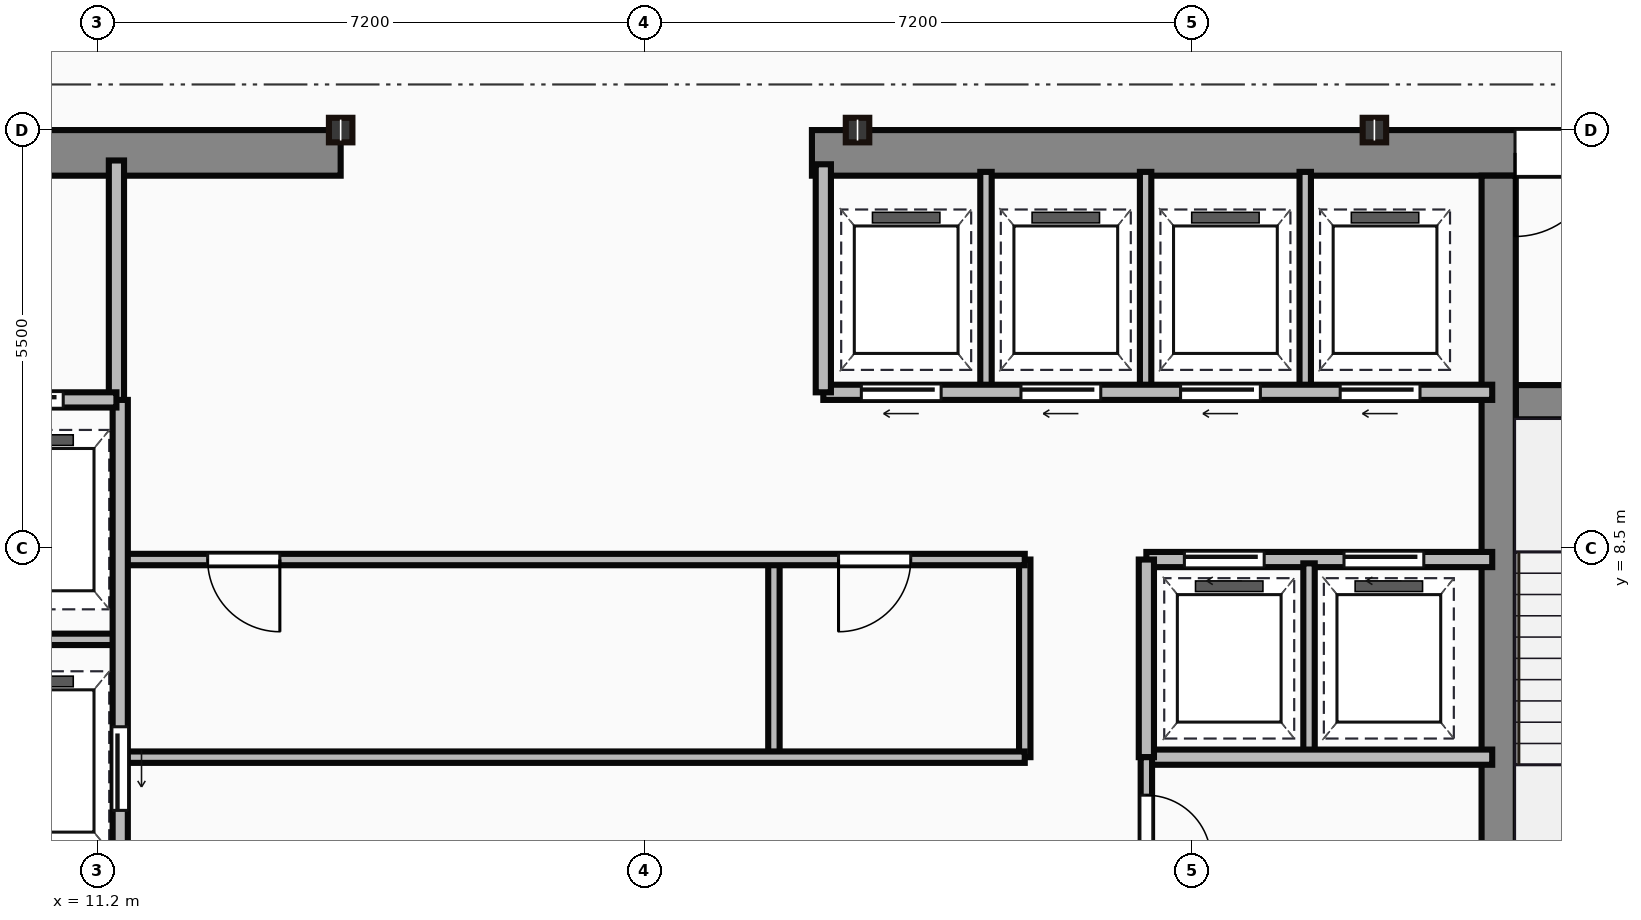
"""IFC4 building model, lengths in metres.
Left out: names, types, materials, properties, quantities, classifications, styles, units other than length and angle.
Written with IfcOpenShell. Run it as: python <this file> out.ifc"""

import sys

from ifc_helpers import new_model, si_unit, direction, frame, frame_2d, origin, origin_2d, place, context, subcontext, project, spatial, rectangle, i_section, extrude, source, transform, mapped, element, fill, save


model = new_model("IFC4")
c1 = context("Model", 3, precision=1e-05, world=origin(), true_north=direction((0.0, 1.0)))
c2 = subcontext(c1, "Body", "Model", "MODEL_VIEW")
j1 = project(units=[si_unit("LENGTHUNIT", "METRE"), si_unit("PLANEANGLEUNIT", "RADIAN")], contexts=[c1])
p1 = place(None, origin())
s1 = spatial("IfcSite", under=j1, at=p1, CompositionType="ELEMENT")
p2 = place(p1, origin())
s2 = spatial("IfcBuilding", under=s1, at=p2, CompositionType="ELEMENT")
p3 = place(p2, frame((0.0, 0.0, 258.8)))
s3 = spatial("IfcBuildingStorey", under=s2, at=p3, CompositionType="ELEMENT", Elevation=258.8)
m1 = source(origin(), c2, "Body", "SweptSolid", [
    extrude(rectangle(XDim=9.1, YDim=0.6, at=frame_2d((4.55, 0.0))), origin(), (0.0, 0.0, 1.0), 3.65),
])
p4 = place(p3, frame((5.3, 13.7, 0.0), z_axis=(0.0, 0.0, 1.0), x_axis=(1.0, 0.0, 0.0)))
e1 = element("IfcWall", 1, at=p4, inside=s3, PredefinedType="SHEAR", context=c2, shape_type="MappedRepresentation", body=[
    mapped(m1, transform((0.0, 0.0, 0.0))),
])
p5 = place(p4, frame((4.1, 0.0, 0.0)))
e2 = element("IfcOpeningElement", 2, at=p5, cuts=e1, PredefinedType="OPENING", context=c2, shape_type="SweptSolid", body=[
    extrude(rectangle(XDim=1.1, YDim=2.15, at=frame_2d((0.55, 1.075))), frame((0.0, 0.31, 0.0), z_axis=(0.0, -1.0, 0.0), x_axis=(1.0, 0.0, 0.0)), (0.0, 0.0, 1.0), 0.62),
])
m2 = source(origin(), c2, "Body", "SweptSolid", [
    extrude(rectangle(XDim=12.6, YDim=0.6, at=frame_2d((6.3, 0.0))), origin(), (0.0, 0.0, 1.0), 3.65),
])
p6 = place(p3, frame((20.6, 13.7, 0.0), z_axis=(0.0, 0.0, 1.0), x_axis=(1.0, 0.0, 0.0)))
e3 = element("IfcWall", 3, at=p6, inside=s3, PredefinedType="SHEAR", context=c2, shape_type="MappedRepresentation", body=[
    mapped(m2, transform((0.0, 0.0, 0.0))),
])
p7 = place(p6, frame((9.25, 0.0, 0.0)))
e4 = element("IfcOpeningElement", 4, at=p7, cuts=e3, PredefinedType="OPENING", context=c2, shape_type="SweptSolid", body=[
    extrude(rectangle(XDim=1.1, YDim=2.15, at=frame_2d((0.55, 1.075))), frame((0.0, 0.31, 0.0), z_axis=(0.0, -1.0, 0.0), x_axis=(1.0, 0.0, 0.0)), (0.0, 0.0, 1.0), 0.62),
])
m3 = source(origin(), c2, "Body", "SweptSolid", [
    extrude(rectangle(XDim=12.5, YDim=0.45, at=frame_2d((6.25, 0.0))), origin(), (0.0, 0.0, 1.0), 3.65),
])
p8 = place(p3, frame((29.635, 0.9, 0.0), z_axis=(0.0, 0.0, 1.0), x_axis=(0.0, 1.0, 0.0)))
e5 = element("IfcWall", 5, at=p8, inside=s3, PredefinedType="SHEAR", context=c2, shape_type="MappedRepresentation", body=[
    mapped(m3, transform((0.0, 0.0, 0.0))),
])
m4 = source(origin(), c2, "Body", "SweptSolid", [
    extrude(rectangle(XDim=3.39, YDim=0.45, at=frame_2d((1.695, 0.0))), origin(), (0.0, 0.0, 1.0), 3.65),
])
p9 = place(p3, frame((29.86, 10.42, 0.0), z_axis=(0.0, 0.0, 1.0), x_axis=(1.0, 0.0, 0.0)))
e6 = element("IfcWall", 6, at=p9, inside=s3, PredefinedType="SHEAR", context=c2, shape_type="MappedRepresentation", body=[
    mapped(m4, transform((0.0, 0.0, 0.0))),
])
p10 = place(p9, frame((1.1, 0.0, 0.0)))
e7 = element("IfcOpeningElement", 7, at=p10, cuts=e6, PredefinedType="OPENING", context=c2, shape_type="SweptSolid", body=[
    extrude(rectangle(XDim=1.1, YDim=2.15, at=frame_2d((0.55, 1.075))), frame((0.0, 0.235, 0.0), z_axis=(0.0, -1.0, 0.0), x_axis=(1.0, 0.0, 0.0)), (0.0, 0.0, 1.0), 0.47),
])
m5 = source(origin(), c2, "Body", "SweptSolid", [
    extrude(i_section(OverallWidth=0.309, OverallDepth=0.323, WebThickness=0.014, FlangeThickness=0.023, at=origin_2d()), origin(), (0.0, 0.0, 1.0), 3.65),
])
for number, where, z_axis, x_axis in (
    (8, (14.4, 14.0, 0.0), (0.0, 0.0, 1.0), (1.0, 0.0, 0.0)),
    (9, (21.2, 14.0, 0.0), (0.0, 0.0, 1.0), (1.0, 0.0, 0.0)),
    (10, (28.0, 14.0, 0.0), (0.0, 0.0, 1.0), (1.0, 0.0, 0.0)),
):
    element("IfcColumn", number, at=place(p3, frame(where, z_axis=z_axis, x_axis=x_axis)), inside=s3, PredefinedType="COLUMN", context=c2, shape_type="MappedRepresentation", body=[
        mapped(m5, transform((0.0, 0.0, 0.0))),
    ])
m6 = source(origin(), c2, "Body", "SweptSolid", [
    extrude(rectangle(XDim=3.18, YDim=0.2, at=frame_2d((1.59, 0.0))), origin(), (0.0, 0.0, 1.0), 3.4),
])
p11 = place(p3, frame((11.45, 10.42, 0.0), z_axis=(0.0, 0.0, 1.0), x_axis=(0.0, 1.0, 0.0)))
e11 = element("IfcWall", 11, at=p11, inside=s3, PredefinedType="PARTITIONING", context=c2, shape_type="MappedRepresentation", body=[
    mapped(m6, transform((0.0, 0.0, 0.0))),
])
m7 = source(origin(), c2, "Body", "SweptSolid", [
    extrude(rectangle(XDim=2.35, YDim=0.2, at=frame_2d((1.175, 0.0))), origin(), (0.0, 0.0, 1.0), 3.4),
])
p12 = place(p3, frame((9.1, 10.45, 0.0), z_axis=(0.0, 0.0, 1.0), x_axis=(1.0, 0.0, 0.0)))
e12 = element("IfcWall", 12, at=p12, inside=s3, PredefinedType="PARTITIONING", context=c2, shape_type="MappedRepresentation", body=[
    mapped(m7, transform((0.0, 0.0, 0.0))),
])
p13 = place(p12, frame((0.55, 0.0, 0.0)))
e13 = element("IfcOpeningElement", 13, at=p13, cuts=e12, PredefinedType="OPENING", context=c2, shape_type="SweptSolid", body=[
    extrude(rectangle(XDim=1.1, YDim=2.15, at=frame_2d((0.55, 1.075))), frame((0.0, 0.11, 0.0), z_axis=(0.0, -1.0, 0.0), x_axis=(1.0, 0.0, 0.0)), (0.0, 0.0, 1.0), 0.22),
])
m8 = source(origin(), c2, "Body", "SweptSolid", [
    extrude(rectangle(XDim=9.6, YDim=0.2, at=frame_2d((4.8, 0.0))), origin(), (0.0, 0.0, 1.0), 3.4),
])
p14 = place(p3, frame((11.5, 0.85, 0.0), z_axis=(0.0, 0.0, 1.0), x_axis=(0.0, 1.0, 0.0)))
e14 = element("IfcWall", 14, at=p14, inside=s3, PredefinedType="PARTITIONING", context=c2, shape_type="MappedRepresentation", body=[
    mapped(m8, transform((0.0, 0.0, 0.0))),
])
p15 = place(p14, frame((4.2, 0.0, 0.0)))
e15 = element("IfcOpeningElement", 15, at=p15, cuts=e14, PredefinedType="OPENING", context=c2, shape_type="SweptSolid", body=[
    extrude(rectangle(XDim=1.1, YDim=2.15, at=frame_2d((0.55, 1.075))), frame((0.0, 0.11, 0.0), z_axis=(0.0, -1.0, 0.0), x_axis=(1.0, 0.0, 0.0)), (0.0, 0.0, 1.0), 0.22),
])
p16 = place(p14, frame((0.9, 0.0, 0.0)))
e16 = element("IfcOpeningElement", 16, at=p16, cuts=e14, PredefinedType="OPENING", context=c2, shape_type="SweptSolid", body=[
    extrude(rectangle(XDim=1.2, YDim=2.15, at=frame_2d((0.6, 1.075))), frame((0.0, 0.11, 0.0), z_axis=(0.0, -1.0, 0.0), x_axis=(1.0, 0.0, 0.0)), (0.0, 0.0, 1.0), 0.22),
])
m9 = source(origin(), c2, "Body", "SweptSolid", [
    extrude(rectangle(XDim=2.4, YDim=0.15, at=frame_2d((1.2, 0.0))), origin(), (0.0, 0.0, 1.0), 3.4),
])
p17 = place(p3, frame((9.1, 7.3, 0.0), z_axis=(0.0, 0.0, 1.0), x_axis=(1.0, 0.0, 0.0)))
e17 = element("IfcWall", 17, at=p17, inside=s3, PredefinedType="PARTITIONING", context=c2, shape_type="MappedRepresentation", body=[
    mapped(m9, transform((0.0, 0.0, 0.0))),
])
m10 = source(origin(), c2, "Body", "SweptSolid", [
    extrude(rectangle(XDim=11.85, YDim=0.15, at=frame_2d((5.925, 0.0))), origin(), (0.0, 0.0, 1.0), 3.4),
])
p18 = place(p3, frame((11.55, 5.75, 0.0), z_axis=(0.0, 0.0, 1.0), x_axis=(1.0, 0.0, 0.0)))
e18 = element("IfcWall", 18, at=p18, inside=s3, PredefinedType="PARTITIONING", context=c2, shape_type="MappedRepresentation", body=[
    mapped(m10, transform((0.0, 0.0, 0.0))),
])
p19 = place(p3, frame((11.55, 8.35, 0.0), z_axis=(0.0, 0.0, 1.0), x_axis=(1.0, 0.0, 0.0)))
e19 = element("IfcWall", 19, at=p19, inside=s3, PredefinedType="PARTITIONING", context=c2, shape_type="MappedRepresentation", body=[
    mapped(m10, transform((0.0, 0.0, 0.0))),
])
p20 = place(p19, frame((1.1, 0.0, 0.0)))
e20 = element("IfcOpeningElement", 20, at=p20, cuts=e19, PredefinedType="OPENING", context=c2, shape_type="SweptSolid", body=[
    extrude(rectangle(XDim=0.95, YDim=2.15, at=frame_2d((0.475, 1.075))), frame((0.0, 0.085, 0.0), z_axis=(0.0, -1.0, 0.0), x_axis=(1.0, 0.0, 0.0)), (0.0, 0.0, 1.0), 0.17),
])
p21 = place(p19, frame((9.4, 0.0, 0.0)))
e21 = element("IfcOpeningElement", 21, at=p21, cuts=e19, PredefinedType="OPENING", context=c2, shape_type="SweptSolid", body=[
    extrude(rectangle(XDim=0.95, YDim=2.15, at=frame_2d((0.475, 1.075))), frame((0.0, 0.085, 0.0), z_axis=(0.0, -1.0, 0.0), x_axis=(1.0, 0.0, 0.0)), (0.0, 0.0, 1.0), 0.17),
])
m11 = source(origin(), c2, "Body", "SweptSolid", [
    extrude(rectangle(XDim=2.6, YDim=0.15, at=frame_2d((1.3, 0.0))), origin(), (0.0, 0.0, 1.0), 3.4),
])
p22 = place(p3, frame((23.4, 5.75, 0.0), z_axis=(0.0, 0.0, 1.0), x_axis=(0.0, 1.0, 0.0)))
e22 = element("IfcWall", 22, at=p22, inside=s3, PredefinedType="PARTITIONING", context=c2, shape_type="MappedRepresentation", body=[
    mapped(m11, transform((0.0, 0.0, 0.0))),
])
m12 = source(origin(), c2, "Body", "SweptSolid", [
    extrude(rectangle(XDim=2.5, YDim=0.15, at=frame_2d((1.25, 0.0))), origin(), (0.0, 0.0, 1.0), 3.4),
])
p23 = place(p3, frame((20.1, 5.8, 0.0), z_axis=(0.0, 0.0, 1.0), x_axis=(0.0, 1.0, 0.0)))
e23 = element("IfcWall", 23, at=p23, inside=s3, PredefinedType="PARTITIONING", context=c2, shape_type="MappedRepresentation", body=[
    mapped(m12, transform((0.0, 0.0, 0.0))),
])
m13 = source(origin(), c2, "Body", "SweptSolid", [
    extrude(rectangle(XDim=8.8, YDim=0.2, at=frame_2d((4.4, 0.0))), origin(), (0.0, 0.0, 1.0), 3.4),
])
p24 = place(p3, frame((20.75, 10.55, 0.0), z_axis=(0.0, 0.0, 1.0), x_axis=(1.0, 0.0, 0.0)))
e24 = element("IfcWall", 24, at=p24, inside=s3, PredefinedType="PARTITIONING", context=c2, shape_type="MappedRepresentation", body=[
    mapped(m13, transform((0.0, 0.0, 0.0))),
])
p25 = place(p24, frame((0.5, 0.0, 0.0)))
e25 = element("IfcOpeningElement", 25, at=p25, cuts=e24, PredefinedType="OPENING", context=c2, shape_type="SweptSolid", body=[
    extrude(rectangle(XDim=1.05, YDim=2.15, at=frame_2d((0.525, 1.075))), frame((0.0, 0.11, 0.0), z_axis=(0.0, -1.0, 0.0), x_axis=(1.0, 0.0, 0.0)), (0.0, 0.0, 1.0), 0.22),
])
p26 = place(p24, frame((2.6, 0.0, 0.0)))
e26 = element("IfcOpeningElement", 26, at=p26, cuts=e24, PredefinedType="OPENING", context=c2, shape_type="SweptSolid", body=[
    extrude(rectangle(XDim=1.05, YDim=2.15, at=frame_2d((0.525, 1.075))), frame((0.0, 0.11, 0.0), z_axis=(0.0, -1.0, 0.0), x_axis=(1.0, 0.0, 0.0)), (0.0, 0.0, 1.0), 0.22),
])
p27 = place(p24, frame((4.7, 0.0, 0.0)))
e27 = element("IfcOpeningElement", 27, at=p27, cuts=e24, PredefinedType="OPENING", context=c2, shape_type="SweptSolid", body=[
    extrude(rectangle(XDim=1.05, YDim=2.15, at=frame_2d((0.525, 1.075))), frame((0.0, 0.11, 0.0), z_axis=(0.0, -1.0, 0.0), x_axis=(1.0, 0.0, 0.0)), (0.0, 0.0, 1.0), 0.22),
])
p28 = place(p24, frame((6.8, 0.0, 0.0)))
e28 = element("IfcOpeningElement", 28, at=p28, cuts=e24, PredefinedType="OPENING", context=c2, shape_type="SweptSolid", body=[
    extrude(rectangle(XDim=1.05, YDim=2.15, at=frame_2d((0.525, 1.075))), frame((0.0, 0.11, 0.0), z_axis=(0.0, -1.0, 0.0), x_axis=(1.0, 0.0, 0.0)), (0.0, 0.0, 1.0), 0.22),
])
m14 = source(origin(), c2, "Body", "SweptSolid", [
    extrude(rectangle(XDim=3.0, YDim=0.2, at=frame_2d((1.5, 0.0))), origin(), (0.0, 0.0, 1.0), 3.4),
])
p29 = place(p3, frame((20.75, 10.55, 0.0), z_axis=(0.0, 0.0, 1.0), x_axis=(0.0, 1.0, 0.0)))
e29 = element("IfcWall", 29, at=p29, inside=s3, PredefinedType="PARTITIONING", context=c2, shape_type="MappedRepresentation", body=[
    mapped(m14, transform((0.0, 0.0, 0.0))),
])
m15 = source(origin(), c2, "Body", "SweptSolid", [
    extrude(rectangle(XDim=2.85, YDim=0.15, at=frame_2d((1.425, 0.0))), origin(), (0.0, 0.0, 1.0), 3.4),
])
for number, where, z_axis, x_axis in (
    (30, (22.89, 10.6, 0.0), (0.0, 0.0, 1.0), (0.0, 1.0, 0.0)),
    (31, (24.99, 10.6, 0.0), (0.0, 0.0, 1.0), (0.0, 1.0, 0.0)),
    (32, (27.09, 10.6, 0.0), (0.0, 0.0, 1.0), (0.0, 1.0, 0.0)),
):
    element("IfcWall", number, at=place(p3, frame(where, z_axis=z_axis, x_axis=x_axis)), inside=s3, PredefinedType="PARTITIONING", context=c2, shape_type="MappedRepresentation", body=[
        mapped(m15, transform((0.0, 0.0, 0.0))),
    ])
m16 = source(origin(), c2, "Body", "SweptSolid", [
    extrude(rectangle(XDim=4.55, YDim=0.2, at=frame_2d((2.275, 0.0))), origin(), (0.0, 0.0, 1.0), 3.4),
])
p30 = place(p3, frame((25.0, 8.35, 0.0), z_axis=(0.0, 0.0, 1.0), x_axis=(1.0, 0.0, 0.0)))
e33 = element("IfcWall", 33, at=p30, inside=s3, PredefinedType="PARTITIONING", context=c2, shape_type="MappedRepresentation", body=[
    mapped(m16, transform((0.0, 0.0, 0.0))),
])
p31 = place(p30, frame((0.5, 0.0, 0.0)))
e34 = element("IfcOpeningElement", 34, at=p31, cuts=e33, PredefinedType="OPENING", context=c2, shape_type="SweptSolid", body=[
    extrude(rectangle(XDim=1.05, YDim=2.15, at=frame_2d((0.525, 1.075))), frame((0.0, 0.11, 0.0), z_axis=(0.0, -1.0, 0.0), x_axis=(1.0, 0.0, 0.0)), (0.0, 0.0, 1.0), 0.22),
])
p32 = place(p30, frame((2.6, 0.0, 0.0)))
e35 = element("IfcOpeningElement", 35, at=p32, cuts=e33, PredefinedType="OPENING", context=c2, shape_type="SweptSolid", body=[
    extrude(rectangle(XDim=1.05, YDim=2.15, at=frame_2d((0.525, 1.075))), frame((0.0, 0.11, 0.0), z_axis=(0.0, -1.0, 0.0), x_axis=(1.0, 0.0, 0.0)), (0.0, 0.0, 1.0), 0.22),
])
p33 = place(p3, frame((25.0, 5.75, 0.0), z_axis=(0.0, 0.0, 1.0), x_axis=(1.0, 0.0, 0.0)))
e36 = element("IfcWall", 36, at=p33, inside=s3, PredefinedType="PARTITIONING", context=c2, shape_type="MappedRepresentation", body=[
    mapped(m16, transform((0.0, 0.0, 0.0))),
])
m17 = source(origin(), c2, "Body", "SweptSolid", [
    extrude(rectangle(XDim=2.6, YDim=0.2, at=frame_2d((1.3, 0.0))), origin(), (0.0, 0.0, 1.0), 3.4),
])
p34 = place(p3, frame((25.0, 5.75, 0.0), z_axis=(0.0, 0.0, 1.0), x_axis=(0.0, 1.0, 0.0)))
e37 = element("IfcWall", 37, at=p34, inside=s3, PredefinedType="PARTITIONING", context=c2, shape_type="MappedRepresentation", body=[
    mapped(m17, transform((0.0, 0.0, 0.0))),
])
p35 = place(p3, frame((27.14, 5.8, 0.0), z_axis=(0.0, 0.0, 1.0), x_axis=(0.0, 1.0, 0.0)))
e38 = element("IfcWall", 38, at=p35, inside=s3, PredefinedType="PARTITIONING", context=c2, shape_type="MappedRepresentation", body=[
    mapped(m12, transform((0.0, 0.0, 0.0))),
])
m18 = source(origin(), c2, "Body", "SweptSolid", [
    extrude(rectangle(XDim=4.9, YDim=0.15, at=frame_2d((2.45, 0.0))), origin(), (0.0, 0.0, 1.0), 3.4),
])
p36 = place(p3, frame((25.0, 0.85, 0.0), z_axis=(0.0, 0.0, 1.0), x_axis=(0.0, 1.0, 0.0)))
e39 = element("IfcWall", 39, at=p36, inside=s3, PredefinedType="PARTITIONING", context=c2, shape_type="MappedRepresentation", body=[
    mapped(m18, transform((0.0, 0.0, 0.0))),
])
p37 = place(p36, frame((1.85, 0.0, 0.0)))
e40 = element("IfcOpeningElement", 40, at=p37, cuts=e39, PredefinedType="OPENING", context=c2, shape_type="SweptSolid", body=[
    extrude(rectangle(XDim=0.95, YDim=2.15, at=frame_2d((0.475, 1.075))), frame((0.0, 0.085, 0.0), z_axis=(0.0, -1.0, 0.0), x_axis=(1.0, 0.0, 0.0)), (0.0, 0.0, 1.0), 0.17),
])
p38 = place(p36, frame((3.55, 0.0, 0.0)))
e41 = element("IfcOpeningElement", 41, at=p38, cuts=e39, PredefinedType="OPENING", context=c2, shape_type="SweptSolid", body=[
    extrude(rectangle(XDim=0.85, YDim=2.15, at=frame_2d((0.425, 1.075))), frame((0.0, 0.085, 0.0), z_axis=(0.0, -1.0, 0.0), x_axis=(1.0, 0.0, 0.0)), (0.0, 0.0, 1.0), 0.17),
])
m19 = source(origin(), c2, "Body", "SweptSolid", [
    extrude(rectangle(XDim=1.1, YDim=2.15, at=frame_2d((0.55, 1.075))), frame((0.0, 0.025, 0.0), z_axis=(0.0, -1.0, 0.0), x_axis=(1.0, 0.0, 0.0)), (0.0, 0.0, 1.0), 0.05),
])
p39 = place(p7, origin())
e42 = element("IfcDoor", 42, at=p39, inside=s3, OperationType="SINGLE_SWING_LEFT", PredefinedType="DOOR", context=c2, shape_type="MappedRepresentation", body=[
    mapped(m19, transform((0.0, 0.0, 0.0))),
])
fill(e4, e42)
p40 = place(p13, origin())
e43 = element("IfcDoor", 43, at=p40, inside=s3, OperationType="SLIDING_TO_LEFT", PredefinedType="DOOR", context=c2, shape_type="MappedRepresentation", body=[
    mapped(m19, transform((0.0, 0.0, 0.0))),
])
fill(e13, e43)
p41 = place(p15, frame((1.1, 0.0, 0.0), z_axis=(0.0, 0.0, 1.0), x_axis=(-1.0, 0.0, 0.0)))
e44 = element("IfcDoor", 44, at=p41, inside=s3, OperationType="SLIDING_TO_LEFT", PredefinedType="DOOR", context=c2, shape_type="MappedRepresentation", body=[
    mapped(m19, transform((0.0, 0.0, 0.0))),
])
fill(e15, e44)
m20 = source(origin(), c2, "Body", "SweptSolid", [
    extrude(rectangle(XDim=0.95, YDim=2.15, at=frame_2d((0.475, 1.075))), frame((0.0, 0.025, 0.0), z_axis=(0.0, -1.0, 0.0), x_axis=(1.0, 0.0, 0.0)), (0.0, 0.0, 1.0), 0.05),
])
p42 = place(p20, origin())
e45 = element("IfcDoor", 45, at=p42, inside=s3, OperationType="SINGLE_SWING_RIGHT", PredefinedType="DOOR", context=c2, shape_type="MappedRepresentation", body=[
    mapped(m20, transform((0.0, 0.0, 0.0))),
])
fill(e20, e45)
p43 = place(p21, origin())
e46 = element("IfcDoor", 46, at=p43, inside=s3, OperationType="SINGLE_SWING_LEFT", PredefinedType="DOOR", context=c2, shape_type="MappedRepresentation", body=[
    mapped(m20, transform((0.0, 0.0, 0.0))),
])
fill(e21, e46)
m21 = source(origin(), c2, "Body", "SweptSolid", [
    extrude(rectangle(XDim=1.05, YDim=2.15, at=frame_2d((0.525, 1.075))), frame((0.0, 0.025, 0.0), z_axis=(0.0, -1.0, 0.0), x_axis=(1.0, 0.0, 0.0)), (0.0, 0.0, 1.0), 0.05),
])
p44 = place(p25, frame((1.05, 0.0, 0.0), z_axis=(0.0, 0.0, 1.0), x_axis=(-1.0, 0.0, 0.0)))
e47 = element("IfcDoor", 47, at=p44, inside=s3, OperationType="SLIDING_TO_LEFT", PredefinedType="DOOR", context=c2, shape_type="MappedRepresentation", body=[
    mapped(m21, transform((0.0, 0.0, 0.0))),
])
fill(e25, e47)
p45 = place(p26, frame((1.05, 0.0, 0.0), z_axis=(0.0, 0.0, 1.0), x_axis=(-1.0, 0.0, 0.0)))
e48 = element("IfcDoor", 48, at=p45, inside=s3, OperationType="SLIDING_TO_LEFT", PredefinedType="DOOR", context=c2, shape_type="MappedRepresentation", body=[
    mapped(m21, transform((0.0, 0.0, 0.0))),
])
fill(e26, e48)
p46 = place(p27, frame((1.05, 0.0, 0.0), z_axis=(0.0, 0.0, 1.0), x_axis=(-1.0, 0.0, 0.0)))
e49 = element("IfcDoor", 49, at=p46, inside=s3, OperationType="SLIDING_TO_LEFT", PredefinedType="DOOR", context=c2, shape_type="MappedRepresentation", body=[
    mapped(m21, transform((0.0, 0.0, 0.0))),
])
fill(e27, e49)
p47 = place(p28, frame((1.05, 0.0, 0.0), z_axis=(0.0, 0.0, 1.0), x_axis=(-1.0, 0.0, 0.0)))
e50 = element("IfcDoor", 50, at=p47, inside=s3, OperationType="SLIDING_TO_LEFT", PredefinedType="DOOR", context=c2, shape_type="MappedRepresentation", body=[
    mapped(m21, transform((0.0, 0.0, 0.0))),
])
fill(e28, e50)
p48 = place(p31, origin())
e51 = element("IfcDoor", 51, at=p48, inside=s3, OperationType="SLIDING_TO_LEFT", PredefinedType="DOOR", context=c2, shape_type="MappedRepresentation", body=[
    mapped(m21, transform((0.0, 0.0, 0.0))),
])
fill(e34, e51)
p49 = place(p32, origin())
e52 = element("IfcDoor", 52, at=p49, inside=s3, OperationType="SLIDING_TO_LEFT", PredefinedType="DOOR", context=c2, shape_type="MappedRepresentation", body=[
    mapped(m21, transform((0.0, 0.0, 0.0))),
])
fill(e35, e52)
m22 = source(origin(), c2, "Body", "SweptSolid", [
    extrude(rectangle(XDim=0.85, YDim=2.15, at=frame_2d((0.425, 1.075))), frame((0.0, 0.025, 0.0), z_axis=(0.0, -1.0, 0.0), x_axis=(1.0, 0.0, 0.0)), (0.0, 0.0, 1.0), 0.05),
])
p50 = place(p38, origin())
e53 = element("IfcDoor", 53, at=p50, inside=s3, OperationType="SINGLE_SWING_LEFT", PredefinedType="DOOR", context=c2, shape_type="MappedRepresentation", body=[
    mapped(m22, transform((0.0, 0.0, 0.0))),
])
fill(e41, e53)
save(model, sys.argv[1])
